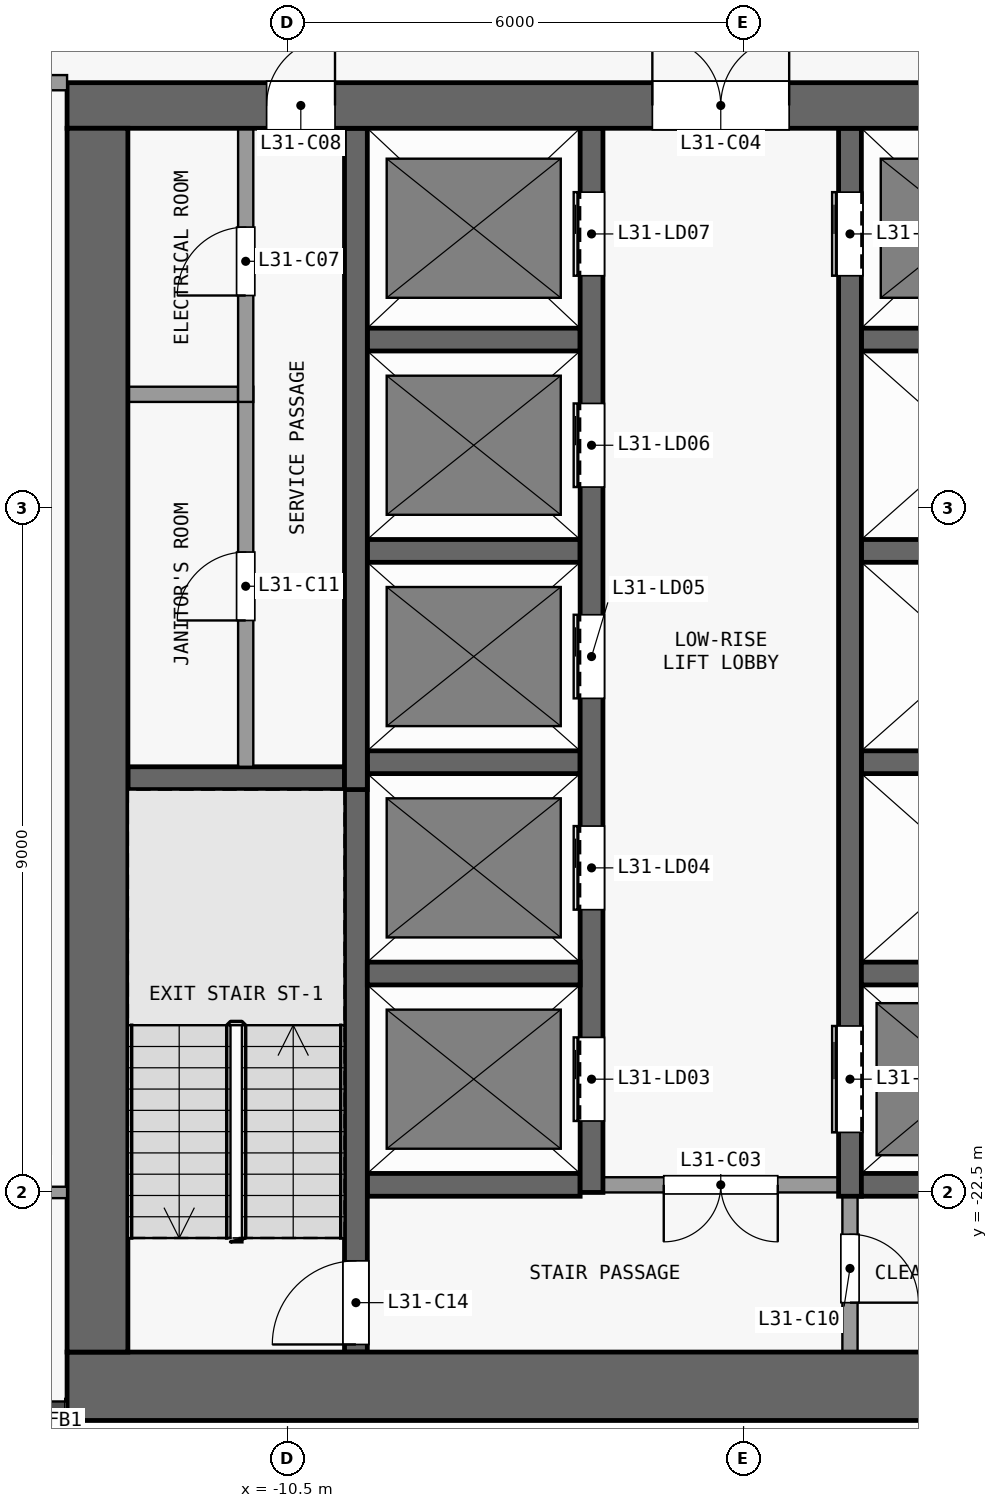
"""IFC4 building model, lengths in metres.
Left out: names, types, materials, properties, quantities, classifications, styles, units other than length and angle.
Written with IfcOpenShell. Run it as: python <this file> out.ifc"""

import sys

from ifc_helpers import new_model, si_unit, direction, frame, frame_2d, origin, place, context, subcontext, project, spatial, rectangle, extrude, element, fill, save


model = new_model("IFC4")
c1 = context("Model", 3, precision=1e-05, world=origin(), true_north=direction((0.0, 1.0)))
c2 = subcontext(c1, "Body", "Model", "MODEL_VIEW")
j1 = project(units=[si_unit("LENGTHUNIT", "METRE"), si_unit("PLANEANGLEUNIT", "RADIAN")], contexts=[c1])
p1 = place(None, origin())
s1 = spatial("IfcSite", under=j1, at=p1, CompositionType="ELEMENT")
p2 = place(p1, origin())
s2 = spatial("IfcBuilding", under=s1, at=p2, CompositionType="ELEMENT")
p3 = place(p2, frame((0.0, 0.0, 124.3)))
s3 = spatial("IfcBuildingStorey", under=s2, at=p3, CompositionType="ELEMENT", Elevation=124.3)
p4 = place(p3, frame((-13.4, -25.05, 0.0), z_axis=(0.0, 0.0, 1.0), x_axis=(1.0, 0.0, 0.0)))
e1 = element("IfcWall", 1, at=p4, inside=s3, PredefinedType="SHEAR", context=c2, shape_type="SweptSolid", body=[
    extrude(rectangle(XDim=26.8, YDim=0.9, at=frame_2d((13.4, 0.0))), origin(), (0.0, 0.0, 1.0), 3.3),
])
p5 = place(p3, frame((-13.4, -8.2, 0.0), z_axis=(0.0, 0.0, 1.0), x_axis=(1.0, 0.0, 0.0)))
e2 = element("IfcWall", 2, at=p5, inside=s3, PredefinedType="SHEAR", context=c2, shape_type="SweptSolid", body=[
    extrude(rectangle(XDim=26.8, YDim=0.6, at=frame_2d((13.4, 0.0))), origin(), (0.0, 0.0, 1.0), 3.3),
])
p6 = place(p5, frame((7.7, 0.0, 0.0)))
e3 = element("IfcOpeningElement", 3, at=p6, cuts=e2, PredefinedType="OPENING", context=c2, shape_type="SweptSolid", body=[
    extrude(rectangle(XDim=1.8, YDim=2.1, at=frame_2d((0.9, 1.05))), frame((0.0, 0.31, 0.0), z_axis=(0.0, -1.0, 0.0), x_axis=(1.0, 0.0, 0.0)), (0.0, 0.0, 1.0), 0.62),
])
p7 = place(p5, frame((17.3, 0.0, 0.0)))
e4 = element("IfcOpeningElement", 4, at=p7, cuts=e2, PredefinedType="OPENING", context=c2, shape_type="SweptSolid", body=[
    extrude(rectangle(XDim=1.8, YDim=2.1, at=frame_2d((0.9, 1.05))), frame((0.0, 0.31, 0.0), z_axis=(0.0, -1.0, 0.0), x_axis=(1.0, 0.0, 0.0)), (0.0, 0.0, 1.0), 0.62),
])
p8 = place(p5, frame((2.625, 0.0, 0.0)))
e5 = element("IfcOpeningElement", 5, at=p8, cuts=e2, PredefinedType="OPENING", context=c2, shape_type="SweptSolid", body=[
    extrude(rectangle(XDim=0.9, YDim=2.1, at=frame_2d((0.45, 1.05))), frame((0.0, 0.31, 0.0), z_axis=(0.0, -1.0, 0.0), x_axis=(1.0, 0.0, 0.0)), (0.0, 0.0, 1.0), 0.62),
])
p9 = place(p5, frame((23.975, 0.0, 0.0)))
e6 = element("IfcOpeningElement", 6, at=p9, cuts=e2, PredefinedType="OPENING", context=c2, shape_type="SweptSolid", body=[
    extrude(rectangle(XDim=1.2, YDim=2.1, at=frame_2d((0.6, 1.05))), frame((0.0, 0.31, 0.0), z_axis=(0.0, -1.0, 0.0), x_axis=(1.0, 0.0, 0.0)), (0.0, 0.0, 1.0), 0.62),
])
p10 = place(p3, frame((-13.0, -24.6, 0.0), z_axis=(0.0, 0.0, 1.0), x_axis=(0.0, 1.0, 0.0)))
e7 = element("IfcWall", 7, at=p10, inside=s3, PredefinedType="SHEAR", context=c2, shape_type="SweptSolid", body=[
    extrude(rectangle(XDim=16.1, YDim=0.8, at=frame_2d((8.05, 0.0))), origin(), (0.0, 0.0, 1.0), 3.3),
])
p11 = place(p3, frame((-9.45, -22.4, 0.0), z_axis=(0.0, 0.0, 1.0), x_axis=(1.0, 0.0, 0.0)))
e8 = element("IfcWall", 8, at=p11, inside=s3, PredefinedType="SHEAR", context=c2, shape_type="SweptSolid", body=[
    extrude(rectangle(XDim=2.8, YDim=0.3, at=frame_2d((1.4, 0.0))), origin(), (0.0, 0.0, 1.0), 3.3),
])
p12 = place(p3, frame((-3.25, -22.4, 0.0), z_axis=(0.0, 0.0, 1.0), x_axis=(-1.0, 0.0, 0.0)))
e9 = element("IfcWall", 9, at=p12, inside=s3, PredefinedType="PARTITIONING", context=c2, shape_type="SweptSolid", body=[
    extrude(rectangle(XDim=3.1, YDim=0.2, at=frame_2d((1.55, 0.0))), origin(), (0.0, 0.0, 1.0), 3.3),
])
p13 = place(p12, frame((0.8, 0.0, 0.0)))
e10 = element("IfcOpeningElement", 10, at=p13, cuts=e9, PredefinedType="OPENING", context=c2, shape_type="SweptSolid", body=[
    extrude(rectangle(XDim=1.5, YDim=2.1, at=frame_2d((0.75, 1.05))), frame((0.0, 0.11, 0.0), z_axis=(0.0, -1.0, 0.0), x_axis=(1.0, 0.0, 0.0)), (0.0, 0.0, 1.0), 0.22),
])
p14 = place(p3, frame((-2.95, -22.4, 0.0), z_axis=(0.0, 0.0, 1.0), x_axis=(1.0, 0.0, 0.0)))
e11 = element("IfcWall", 11, at=p14, inside=s3, PredefinedType="SHEAR", context=c2, shape_type="SweptSolid", body=[
    extrude(rectangle(XDim=5.9, YDim=0.3, at=frame_2d((2.95, 0.0))), origin(), (0.0, 0.0, 1.0), 3.3),
])
for number, where, z_axis, x_axis in (
    (12, (-9.45, -19.62, 0.0), (0.0, 0.0, 1.0), (1.0, 0.0, 0.0)),
    (13, (-2.95, -19.62, 0.0), (0.0, 0.0, 1.0), (1.0, 0.0, 0.0)),
):
    element("IfcWall", number, at=place(p3, frame(where, z_axis=z_axis, x_axis=x_axis)), inside=s3, PredefinedType="SHEAR", context=c2, shape_type="SweptSolid", body=[
        extrude(rectangle(XDim=2.8, YDim=0.3, at=frame_2d((1.4, 0.0))), origin(), (0.0, 0.0, 1.0), 3.3),
    ])
p15 = place(p3, frame((-12.6, -17.05, 0.0), z_axis=(0.0, 0.0, 1.0), x_axis=(1.0, 0.0, 0.0)))
e14 = element("IfcWall", 14, at=p15, inside=s3, PredefinedType="SHEAR", context=c2, shape_type="SweptSolid", body=[
    extrude(rectangle(XDim=2.85, YDim=0.3, at=frame_2d((1.425, 0.0))), origin(), (0.0, 0.0, 1.0), 3.3),
])
for number, where, z_axis, x_axis in (
    (15, (-9.45, -16.84, 0.0), (0.0, 0.0, 1.0), (1.0, 0.0, 0.0)),
    (16, (-2.95, -16.84, 0.0), (0.0, 0.0, 1.0), (1.0, 0.0, 0.0)),
    (17, (-9.45, -14.06, 0.0), (0.0, 0.0, 1.0), (1.0, 0.0, 0.0)),
    (18, (-2.95, -14.06, 0.0), (0.0, 0.0, 1.0), (1.0, 0.0, 0.0)),
):
    element("IfcWall", number, at=place(p3, frame(where, z_axis=z_axis, x_axis=x_axis)), inside=s3, PredefinedType="SHEAR", context=c2, shape_type="SweptSolid", body=[
        extrude(rectangle(XDim=2.8, YDim=0.3, at=frame_2d((1.4, 0.0))), origin(), (0.0, 0.0, 1.0), 3.3),
    ])
p16 = place(p3, frame((-12.6, -12.0, 0.0), z_axis=(0.0, 0.0, 1.0), x_axis=(1.0, 0.0, 0.0)))
e19 = element("IfcWall", 19, at=p16, inside=s3, PredefinedType="PARTITIONING", context=c2, shape_type="SweptSolid", body=[
    extrude(rectangle(XDim=1.45, YDim=0.2, at=frame_2d((0.725, 0.0))), origin(), (0.0, 0.0, 1.0), 3.3),
])
for number, where, z_axis, x_axis in (
    (20, (-9.45, -11.28, 0.0), (0.0, 0.0, 1.0), (1.0, 0.0, 0.0)),
    (21, (-2.95, -11.28, 0.0), (0.0, 0.0, 1.0), (1.0, 0.0, 0.0)),
):
    element("IfcWall", number, at=place(p3, frame(where, z_axis=z_axis, x_axis=x_axis)), inside=s3, PredefinedType="SHEAR", context=c2, shape_type="SweptSolid", body=[
        extrude(rectangle(XDim=2.8, YDim=0.3, at=frame_2d((1.4, 0.0))), origin(), (0.0, 0.0, 1.0), 3.3),
    ])
p17 = place(p3, frame((-11.05, -16.9, 0.0), z_axis=(0.0, 0.0, 1.0), x_axis=(0.0, 1.0, 0.0)))
e22 = element("IfcWall", 22, at=p17, inside=s3, PredefinedType="PARTITIONING", context=c2, shape_type="SweptSolid", body=[
    extrude(rectangle(XDim=5.0, YDim=0.2, at=frame_2d((2.5, 0.0))), origin(), (0.0, 0.0, 1.0), 3.3),
])
p18 = place(p17, frame((1.925, 0.0, 0.0)))
e23 = element("IfcOpeningElement", 23, at=p18, cuts=e22, PredefinedType="OPENING", context=c2, shape_type="SweptSolid", body=[
    extrude(rectangle(XDim=0.9, YDim=2.1, at=frame_2d((0.45, 1.05))), frame((0.0, 0.11, 0.0), z_axis=(0.0, -1.0, 0.0), x_axis=(1.0, 0.0, 0.0)), (0.0, 0.0, 1.0), 0.22),
])
p19 = place(p3, frame((-11.05, -12.1, 0.0), z_axis=(0.0, 0.0, 1.0), x_axis=(0.0, 1.0, 0.0)))
e24 = element("IfcWall", 24, at=p19, inside=s3, PredefinedType="PARTITIONING", context=c2, shape_type="SweptSolid", body=[
    extrude(rectangle(XDim=3.6, YDim=0.2, at=frame_2d((1.8, 0.0))), origin(), (0.0, 0.0, 1.0), 3.3),
])
p20 = place(p19, frame((1.4, 0.0, 0.0)))
e25 = element("IfcOpeningElement", 25, at=p20, cuts=e24, PredefinedType="OPENING", context=c2, shape_type="SweptSolid", body=[
    extrude(rectangle(XDim=0.9, YDim=2.1, at=frame_2d((0.45, 1.05))), frame((0.0, 0.11, 0.0), z_axis=(0.0, -1.0, 0.0), x_axis=(1.0, 0.0, 0.0)), (0.0, 0.0, 1.0), 0.22),
])
p21 = place(p3, frame((-9.6, -24.6, 0.0), z_axis=(0.0, 0.0, 1.0), x_axis=(0.0, 1.0, 0.0)))
e26 = element("IfcWall", 26, at=p21, inside=s3, PredefinedType="SHEAR", context=c2, shape_type="SweptSolid", body=[
    extrude(rectangle(XDim=7.7, YDim=0.3, at=frame_2d((3.85, 0.0))), origin(), (0.0, 0.0, 1.0), 3.3),
])
p22 = place(p21, frame((0.1, 0.0, 0.0)))
e27 = element("IfcOpeningElement", 27, at=p22, cuts=e26, PredefinedType="OPENING", context=c2, shape_type="SweptSolid", body=[
    extrude(rectangle(XDim=1.1, YDim=2.1, at=frame_2d((0.55, 1.05))), frame((0.0, 0.16, 0.0), z_axis=(0.0, -1.0, 0.0), x_axis=(1.0, 0.0, 0.0)), (0.0, 0.0, 1.0), 0.32),
])
p23 = place(p3, frame((-9.6, -17.2, 0.0), z_axis=(0.0, 0.0, 1.0), x_axis=(0.0, 1.0, 0.0)))
e28 = element("IfcWall", 28, at=p23, inside=s3, PredefinedType="SHEAR", context=c2, shape_type="SweptSolid", body=[
    extrude(rectangle(XDim=8.7, YDim=0.3, at=frame_2d((4.35, 0.0))), origin(), (0.0, 0.0, 1.0), 3.3),
])
p24 = place(p3, frame((-6.5, -22.5, 0.0), z_axis=(0.0, 0.0, 1.0), x_axis=(0.0, 1.0, 0.0)))
e29 = element("IfcWall", 29, at=p24, inside=s3, PredefinedType="SHEAR", context=c2, shape_type="SweptSolid", body=[
    extrude(rectangle(XDim=14.0, YDim=0.3, at=frame_2d((7.0, 0.0))), origin(), (0.0, 0.0, 1.0), 3.3),
])
p25 = place(p24, frame((0.94, 0.0, 0.0)))
e30 = element("IfcOpeningElement", 30, at=p25, cuts=e29, PredefinedType="OPENING", context=c2, shape_type="SweptSolid", body=[
    extrude(rectangle(XDim=1.1, YDim=2.1, at=frame_2d((0.55, 1.05))), frame((0.0, 0.16, 0.0), z_axis=(0.0, -1.0, 0.0), x_axis=(1.0, 0.0, 0.0)), (0.0, 0.0, 1.0), 0.32),
])
p26 = place(p24, frame((3.72, 0.0, 0.0)))
e31 = element("IfcOpeningElement", 31, at=p26, cuts=e29, PredefinedType="OPENING", context=c2, shape_type="SweptSolid", body=[
    extrude(rectangle(XDim=1.1, YDim=2.1, at=frame_2d((0.55, 1.05))), frame((0.0, 0.16, 0.0), z_axis=(0.0, -1.0, 0.0), x_axis=(1.0, 0.0, 0.0)), (0.0, 0.0, 1.0), 0.32),
])
p27 = place(p24, frame((6.5, 0.0, 0.0)))
e32 = element("IfcOpeningElement", 32, at=p27, cuts=e29, PredefinedType="OPENING", context=c2, shape_type="SweptSolid", body=[
    extrude(rectangle(XDim=1.1, YDim=2.1, at=frame_2d((0.55, 1.05))), frame((0.0, 0.16, 0.0), z_axis=(0.0, -1.0, 0.0), x_axis=(1.0, 0.0, 0.0)), (0.0, 0.0, 1.0), 0.32),
])
p28 = place(p24, frame((9.28, 0.0, 0.0)))
e33 = element("IfcOpeningElement", 33, at=p28, cuts=e29, PredefinedType="OPENING", context=c2, shape_type="SweptSolid", body=[
    extrude(rectangle(XDim=1.1, YDim=2.1, at=frame_2d((0.55, 1.05))), frame((0.0, 0.16, 0.0), z_axis=(0.0, -1.0, 0.0), x_axis=(1.0, 0.0, 0.0)), (0.0, 0.0, 1.0), 0.32),
])
p29 = place(p24, frame((12.06, 0.0, 0.0)))
e34 = element("IfcOpeningElement", 34, at=p29, cuts=e29, PredefinedType="OPENING", context=c2, shape_type="SweptSolid", body=[
    extrude(rectangle(XDim=1.1, YDim=2.1, at=frame_2d((0.55, 1.05))), frame((0.0, 0.16, 0.0), z_axis=(0.0, -1.0, 0.0), x_axis=(1.0, 0.0, 0.0)), (0.0, 0.0, 1.0), 0.32),
])
p30 = place(p3, frame((-3.1, -22.55, 0.0), z_axis=(0.0, 0.0, 1.0), x_axis=(0.0, -1.0, 0.0)))
e35 = element("IfcWall", 35, at=p30, inside=s3, PredefinedType="PARTITIONING", context=c2, shape_type="SweptSolid", body=[
    extrude(rectangle(XDim=2.05, YDim=0.2, at=frame_2d((1.025, 0.0))), origin(), (0.0, 0.0, 1.0), 3.3),
])
p31 = place(p30, frame((0.5, 0.0, 0.0)))
e36 = element("IfcOpeningElement", 36, at=p31, cuts=e35, PredefinedType="OPENING", context=c2, shape_type="SweptSolid", body=[
    extrude(rectangle(XDim=0.9, YDim=2.1, at=frame_2d((0.45, 1.05))), frame((0.0, 0.11, 0.0), z_axis=(0.0, -1.0, 0.0), x_axis=(1.0, 0.0, 0.0)), (0.0, 0.0, 1.0), 0.22),
])
p32 = place(p3, frame((-3.1, -22.55, 0.0), z_axis=(0.0, 0.0, 1.0), x_axis=(0.0, 1.0, 0.0)))
e37 = element("IfcWall", 37, at=p32, inside=s3, PredefinedType="SHEAR", context=c2, shape_type="SweptSolid", body=[
    extrude(rectangle(XDim=14.05, YDim=0.3, at=frame_2d((7.025, 0.0))), origin(), (0.0, 0.0, 1.0), 3.3),
])
p33 = place(p32, frame((12.11, 0.0, 0.0)))
e38 = element("IfcOpeningElement", 38, at=p33, cuts=e37, PredefinedType="OPENING", context=c2, shape_type="SweptSolid", body=[
    extrude(rectangle(XDim=1.1, YDim=2.1, at=frame_2d((0.55, 1.05))), frame((0.0, 0.16, 0.0), z_axis=(0.0, -1.0, 0.0), x_axis=(1.0, 0.0, 0.0)), (0.0, 0.0, 1.0), 0.32),
])
p34 = place(p32, frame((0.84, 0.0, 0.0)))
e39 = element("IfcOpeningElement", 39, at=p34, cuts=e37, PredefinedType="OPENING", context=c2, shape_type="SweptSolid", body=[
    extrude(rectangle(XDim=1.4, YDim=2.1, at=frame_2d((0.7, 1.05))), frame((0.0, 0.16, 0.0), z_axis=(0.0, -1.0, 0.0), x_axis=(1.0, 0.0, 0.0)), (0.0, 0.0, 1.0), 0.32),
])
p35 = place(p3, frame((-16.325, -22.5, 0.0), z_axis=(0.0, 0.0, 1.0), x_axis=(1.0, 0.0, 0.0)))
e40 = element("IfcWall", 40, at=p35, inside=s3, PredefinedType="PARTITIONING", context=c2, shape_type="SweptSolid", body=[
    extrude(rectangle(XDim=2.925, YDim=0.15, at=frame_2d((1.462, 0.0))), origin(), (0.0, 0.0, 1.0), 3.3),
])
p36 = place(p35, frame((1.0, 0.0, 0.0)))
e41 = element("IfcOpeningElement", 41, at=p36, cuts=e40, PredefinedType="OPENING", context=c2, shape_type="SweptSolid", body=[
    extrude(rectangle(XDim=0.9, YDim=2.1, at=frame_2d((0.45, 1.05))), frame((0.0, 0.085, 0.0), z_axis=(0.0, -1.0, 0.0), x_axis=(1.0, 0.0, 0.0)), (0.0, 0.0, 1.0), 0.17),
])
p37 = place(p3, frame((-26.15, -7.9, 0.0), z_axis=(0.0, 0.0, 1.0), x_axis=(1.0, 0.0, 0.0)))
e42 = element("IfcWall", 42, at=p37, inside=s3, PredefinedType="PARTITIONING", context=c2, shape_type="SweptSolid", body=[
    extrude(rectangle(XDim=12.75, YDim=0.2, at=frame_2d((6.375, 0.0))), origin(), (0.0, 0.0, 1.0), 3.3),
])
p38 = place(p37, frame((10.75, 0.0, 0.0)))
e43 = element("IfcOpeningElement", 43, at=p38, cuts=e42, PredefinedType="OPENING", context=c2, shape_type="SweptSolid", body=[
    extrude(rectangle(XDim=1.0, YDim=2.1, at=frame_2d((0.5, 1.05))), frame((0.0, 0.11, 0.0), z_axis=(0.0, -1.0, 0.0), x_axis=(1.0, 0.0, 0.0)), (0.0, 0.0, 1.0), 0.22),
])
p39 = place(p25, origin())
e44 = element("IfcDoor", 44, at=p39, inside=s3, OperationType="DOUBLE_DOOR_SLIDING", PredefinedType="DOOR", context=c2, shape_type="SweptSolid", body=[
    extrude(rectangle(XDim=1.1, YDim=2.1, at=frame_2d((0.55, 1.05))), frame((0.0, 0.025, 0.0), z_axis=(0.0, -1.0, 0.0), x_axis=(1.0, 0.0, 0.0)), (0.0, 0.0, 1.0), 0.05),
])
fill(e30, e44)
p40 = place(p26, origin())
e45 = element("IfcDoor", 45, at=p40, inside=s3, OperationType="DOUBLE_DOOR_SLIDING", PredefinedType="DOOR", context=c2, shape_type="SweptSolid", body=[
    extrude(rectangle(XDim=1.1, YDim=2.1, at=frame_2d((0.55, 1.05))), frame((0.0, 0.025, 0.0), z_axis=(0.0, -1.0, 0.0), x_axis=(1.0, 0.0, 0.0)), (0.0, 0.0, 1.0), 0.05),
])
fill(e31, e45)
p41 = place(p27, origin())
e46 = element("IfcDoor", 46, at=p41, inside=s3, OperationType="DOUBLE_DOOR_SLIDING", PredefinedType="DOOR", context=c2, shape_type="SweptSolid", body=[
    extrude(rectangle(XDim=1.1, YDim=2.1, at=frame_2d((0.55, 1.05))), frame((0.0, 0.025, 0.0), z_axis=(0.0, -1.0, 0.0), x_axis=(1.0, 0.0, 0.0)), (0.0, 0.0, 1.0), 0.05),
])
fill(e32, e46)
p42 = place(p28, origin())
e47 = element("IfcDoor", 47, at=p42, inside=s3, OperationType="DOUBLE_DOOR_SLIDING", PredefinedType="DOOR", context=c2, shape_type="SweptSolid", body=[
    extrude(rectangle(XDim=1.1, YDim=2.1, at=frame_2d((0.55, 1.05))), frame((0.0, 0.025, 0.0), z_axis=(0.0, -1.0, 0.0), x_axis=(1.0, 0.0, 0.0)), (0.0, 0.0, 1.0), 0.05),
])
fill(e33, e47)
p43 = place(p29, origin())
e48 = element("IfcDoor", 48, at=p43, inside=s3, OperationType="DOUBLE_DOOR_SLIDING", PredefinedType="DOOR", context=c2, shape_type="SweptSolid", body=[
    extrude(rectangle(XDim=1.1, YDim=2.1, at=frame_2d((0.55, 1.05))), frame((0.0, 0.025, 0.0), z_axis=(0.0, -1.0, 0.0), x_axis=(1.0, 0.0, 0.0)), (0.0, 0.0, 1.0), 0.05),
])
fill(e34, e48)
p44 = place(p33, origin())
e49 = element("IfcDoor", 49, at=p44, inside=s3, OperationType="DOUBLE_DOOR_SLIDING", PredefinedType="DOOR", context=c2, shape_type="SweptSolid", body=[
    extrude(rectangle(XDim=1.1, YDim=2.1, at=frame_2d((0.55, 1.05))), frame((0.0, 0.025, 0.0), z_axis=(0.0, -1.0, 0.0), x_axis=(1.0, 0.0, 0.0)), (0.0, 0.0, 1.0), 0.05),
])
fill(e38, e49)
p45 = place(p34, origin())
e50 = element("IfcDoor", 50, at=p45, inside=s3, OperationType="DOUBLE_DOOR_SLIDING", PredefinedType="DOOR", context=c2, shape_type="SweptSolid", body=[
    extrude(rectangle(XDim=1.4, YDim=2.1, at=frame_2d((0.7, 1.05))), frame((0.0, 0.025, 0.0), z_axis=(0.0, -1.0, 0.0), x_axis=(1.0, 0.0, 0.0)), (0.0, 0.0, 1.0), 0.05),
])
fill(e39, e50)
p46 = place(p13, origin())
e51 = element("IfcDoor", 51, at=p46, inside=s3, OperationType="DOUBLE_DOOR_SINGLE_SWING", PredefinedType="DOOR", context=c2, shape_type="SweptSolid", body=[
    extrude(rectangle(XDim=1.5, YDim=2.1, at=frame_2d((0.75, 1.05))), frame((0.0, 0.025, 0.0), z_axis=(0.0, -1.0, 0.0), x_axis=(1.0, 0.0, 0.0)), (0.0, 0.0, 1.0), 0.05),
])
fill(e10, e51)
p47 = place(p6, origin())
e52 = element("IfcDoor", 52, at=p47, inside=s3, OperationType="DOUBLE_DOOR_SINGLE_SWING", PredefinedType="DOOR", context=c2, shape_type="SweptSolid", body=[
    extrude(rectangle(XDim=1.8, YDim=2.1, at=frame_2d((0.9, 1.05))), frame((0.0, 0.025, 0.0), z_axis=(0.0, -1.0, 0.0), x_axis=(1.0, 0.0, 0.0)), (0.0, 0.0, 1.0), 0.05),
])
fill(e3, e52)
p48 = place(p20, origin())
e53 = element("IfcDoor", 53, at=p48, inside=s3, OperationType="SINGLE_SWING_LEFT", PredefinedType="DOOR", context=c2, shape_type="SweptSolid", body=[
    extrude(rectangle(XDim=0.9, YDim=2.1, at=frame_2d((0.45, 1.05))), frame((0.0, 0.025, 0.0), z_axis=(0.0, -1.0, 0.0), x_axis=(1.0, 0.0, 0.0)), (0.0, 0.0, 1.0), 0.05),
])
fill(e25, e53)
p49 = place(p8, origin())
e54 = element("IfcDoor", 54, at=p49, inside=s3, OperationType="SINGLE_SWING_RIGHT", PredefinedType="DOOR", context=c2, shape_type="SweptSolid", body=[
    extrude(rectangle(XDim=0.9, YDim=2.1, at=frame_2d((0.45, 1.05))), frame((0.0, 0.025, 0.0), z_axis=(0.0, -1.0, 0.0), x_axis=(1.0, 0.0, 0.0)), (0.0, 0.0, 1.0), 0.05),
])
fill(e5, e54)
p50 = place(p31, origin())
e55 = element("IfcDoor", 55, at=p50, inside=s3, OperationType="SINGLE_SWING_RIGHT", PredefinedType="DOOR", context=c2, shape_type="SweptSolid", body=[
    extrude(rectangle(XDim=0.9, YDim=2.1, at=frame_2d((0.45, 1.05))), frame((0.0, 0.025, 0.0), z_axis=(0.0, -1.0, 0.0), x_axis=(1.0, 0.0, 0.0)), (0.0, 0.0, 1.0), 0.05),
])
fill(e36, e55)
p51 = place(p18, origin())
e56 = element("IfcDoor", 56, at=p51, inside=s3, OperationType="SINGLE_SWING_LEFT", PredefinedType="DOOR", context=c2, shape_type="SweptSolid", body=[
    extrude(rectangle(XDim=0.9, YDim=2.1, at=frame_2d((0.45, 1.05))), frame((0.0, 0.025, 0.0), z_axis=(0.0, -1.0, 0.0), x_axis=(1.0, 0.0, 0.0)), (0.0, 0.0, 1.0), 0.05),
])
fill(e23, e56)
p52 = place(p22, origin())
e57 = element("IfcDoor", 57, at=p52, inside=s3, OperationType="SINGLE_SWING_LEFT", PredefinedType="DOOR", context=c2, shape_type="SweptSolid", body=[
    extrude(rectangle(XDim=1.1, YDim=2.1, at=frame_2d((0.55, 1.05))), frame((0.0, 0.025, 0.0), z_axis=(0.0, -1.0, 0.0), x_axis=(1.0, 0.0, 0.0)), (0.0, 0.0, 1.0), 0.05),
])
fill(e27, e57)
save(model, sys.argv[1])
